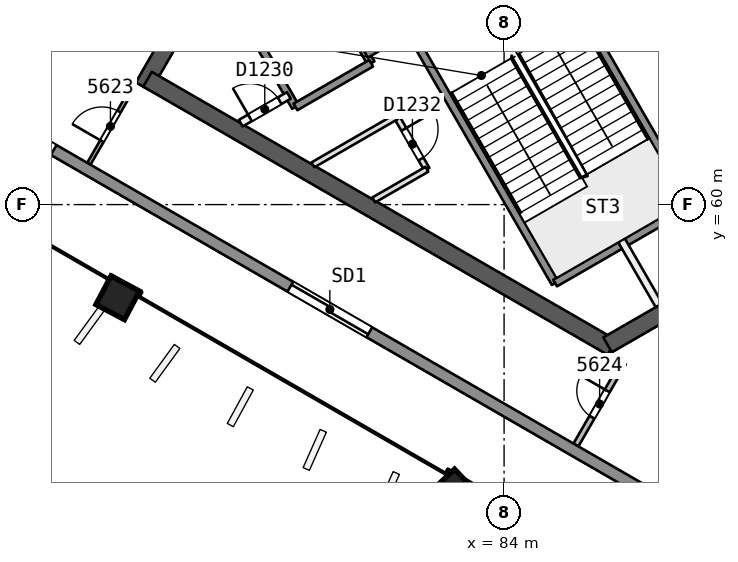
"""IFC4 building model, lengths in metres.
Left out: names, types, materials, properties, quantities, classifications, styles, units other than length and angle.
Written with IfcOpenShell. Run it as: python <this file> out.ifc"""

import sys

from ifc_helpers import new_model, si_unit, direction, frame, frame_2d, origin, origin_2d, place, context, subcontext, project, spatial, rectangle, extrude, element, fill, save


model = new_model("IFC4")
c1 = context("Model", 3, precision=1e-05, world=origin(), true_north=direction((0.0, 1.0)))
c2 = subcontext(c1, "Body", "Model", "MODEL_VIEW")
j1 = project(units=[si_unit("LENGTHUNIT", "METRE"), si_unit("PLANEANGLEUNIT", "RADIAN")], contexts=[c1])
p1 = place(None, origin())
s1 = spatial("IfcSite", under=j1, at=p1, CompositionType="ELEMENT")
p2 = place(p1, origin())
s2 = spatial("IfcBuilding", under=s1, at=p2, CompositionType="ELEMENT")
p3 = place(p2, frame((0.0, 0.0, 228.0)))
s3 = spatial("IfcBuildingStorey", under=s2, at=p3, CompositionType="ELEMENT", Elevation=228.0)
p4 = place(p3, frame((79.63, 71.981, 0.0), z_axis=(0.0, 0.0, 1.0), x_axis=(-0.500002171595, -0.86602415001, 0.0)))
e1 = element("IfcWall", 1, at=p4, inside=s3, PredefinedType="SHEAR", context=c2, shape_type="SweptSolid", body=[
    extrude(rectangle(XDim=10.25, YDim=0.45, at=frame_2d((5.125, 0.0))), origin(), (0.0, 0.0, 1.0), 3.7),
])
p5 = place(p4, frame((0.82, 0.0, 0.0)))
e2 = element("IfcOpeningElement", 2, at=p5, cuts=e1, PredefinedType="OPENING", context=c2, shape_type="SweptSolid", body=[
    extrude(rectangle(XDim=1.2, YDim=2.1, at=frame_2d((0.6, 1.05))), frame((0.0, 0.235, 0.0), z_axis=(0.0, -1.0, 0.0), x_axis=(1.0, 0.0, 0.0)), (0.0, 0.0, 1.0), 0.471),
])
p6 = place(p3, frame((74.617, 63.299, 0.0), z_axis=(0.0, 0.0, 1.0), x_axis=(0.86602594008, -0.499999071108, 0.0)))
e3 = element("IfcWall", 3, at=p6, inside=s3, PredefinedType="SHEAR", context=c2, shape_type="SweptSolid", body=[
    extrude(rectangle(XDim=14.108, YDim=0.45, at=frame_2d((7.054, 0.0))), origin(), (0.0, 0.0, 1.0), 3.7),
])
p7 = place(p3, frame((86.723, 56.31, 0.0), z_axis=(0.0, 0.0, 1.0), x_axis=(0.866042179588, 0.49997094233, 0.0)))
e4 = element("IfcWall", 4, at=p7, inside=s3, PredefinedType="SHEAR", context=c2, shape_type="SweptSolid", body=[
    extrude(rectangle(XDim=3.515, YDim=0.45, at=frame_2d((1.758, 0.0))), origin(), (0.0, 0.0, 1.0), 3.7),
])
p8 = place(p3, frame((73.832, 57.52, 0.0), z_axis=(0.000857578916, 0.022824792675, 0.999739112668), x_axis=(-0.499948827021, -0.865819429986, 0.020196163479)))
e5 = element("IfcColumn", 5, at=p8, inside=s3, PredefinedType="COLUMN", context=c2, shape_type="SweptSolid", body=[
    extrude(rectangle(XDim=0.85, YDim=0.85, at=origin_2d()), origin(), (0.0, 0.0, 1.0), 3.701),
])
p9 = place(p3, frame((82.69, 52.406, 0.0), z_axis=(-0.008376454378, 0.028163354484, 0.999568237028), x_axis=(-0.500239696169, -0.865651362756, 0.020198132002)))
e6 = element("IfcColumn", 6, at=p9, inside=s3, PredefinedType="COLUMN", context=c2, shape_type="SweptSolid", body=[
    extrude(rectangle(XDim=0.85, YDim=0.85, at=origin_2d()), origin(), (0.0, 0.0, 1.0), 3.702),
])
p10 = place(p3, frame((69.293, 63.257, 0.0), z_axis=(0.0, 0.0, 1.0), x_axis=(0.49999314277, 0.866029362772, 0.0)))
e7 = element("IfcWall", 7, at=p10, inside=s3, PredefinedType="PARTITIONING", context=c2, shape_type="SweptSolid", body=[
    extrude(rectangle(XDim=10.254, YDim=0.2, at=frame_2d((5.127, 0.0))), origin(), (0.0, 0.0, 1.0), 3.3),
])
p11 = place(p3, frame((73.073, 61.074, 0.0), z_axis=(0.0, 0.0, 1.0), x_axis=(0.499948534732, 0.866055115232, 0.0)))
e8 = element("IfcWall", 8, at=p11, inside=s3, PredefinedType="PARTITIONING", context=c2, shape_type="SweptSolid", body=[
    extrude(rectangle(XDim=2.275, YDim=0.1, at=frame_2d((1.137, 0.0))), origin(), (0.0, 0.0, 1.0), 3.3),
])
p12 = place(p11, frame((0.687, 0.0, 0.0)))
e9 = element("IfcOpeningElement", 9, at=p12, cuts=e8, PredefinedType="OPENING", context=c2, shape_type="SweptSolid", body=[
    extrude(rectangle(XDim=0.9, YDim=2.1, at=frame_2d((0.45, 1.05))), frame((0.0, 0.061, 0.0), z_axis=(0.0, -1.0, 0.0), x_axis=(1.0, 0.0, 0.0)), (0.0, 0.0, 1.0), 0.121),
])
p13 = place(p3, frame((85.89, 53.674, 0.0), z_axis=(0.0, 0.0, 1.0), x_axis=(0.500047477074, 0.865997991148, 0.0)))
e10 = element("IfcWall", 10, at=p13, inside=s3, PredefinedType="PARTITIONING", context=c2, shape_type="SweptSolid", body=[
    extrude(rectangle(XDim=2.492, YDim=0.15, at=frame_2d((1.246, 0.0))), origin(), (0.0, 0.0, 1.0), 3.3),
])
p14 = place(p13, frame((0.846, 0.0, 0.0)))
e11 = element("IfcOpeningElement", 11, at=p14, cuts=e10, PredefinedType="OPENING", context=c2, shape_type="SweptSolid", body=[
    extrude(rectangle(XDim=0.8, YDim=2.1, at=frame_2d((0.4, 1.05))), frame((0.0, 0.085, 0.0), z_axis=(0.0, -1.0, 0.0), x_axis=(1.0, 0.0, 0.0)), (0.0, 0.0, 1.0), 0.171),
])
p15 = place(p3, frame((92.503, 54.834, 0.0), z_axis=(0.0, 0.0, 1.0), x_axis=(-0.866011086668, -0.500024797153, 0.0)))
e12 = element("IfcWall", 12, at=p15, inside=s3, PredefinedType="SOLIDWALL", context=c2, shape_type="SweptSolid", body=[
    extrude(rectangle(XDim=5.149, YDim=0.3, at=frame_2d((2.575, 0.0))), origin(), (0.0, 0.0, 1.0), 3.3),
])
p16 = place(p3, frame((88.043, 52.259, 0.0), z_axis=(0.0, 0.0, 1.0), x_axis=(-0.86602387423, 0.500002649256, 0.0)))
e13 = element("IfcWall", 13, at=p16, inside=s3, PredefinedType="SOLIDWALL", context=c2, shape_type="SweptSolid", body=[
    extrude(rectangle(XDim=50.333, YDim=0.3, at=frame_2d((25.167, 0.0))), origin(), (0.0, 0.0, 1.0), 3.3),
])
p17 = place(p16, frame((23.187, 0.0, 0.0)))
e14 = element("IfcOpeningElement", 14, at=p17, cuts=e13, PredefinedType="OPENING", context=c2, shape_type="SweptSolid", body=[
    extrude(rectangle(XDim=2.4, YDim=2.4, at=frame_2d((1.2, 1.2))), frame((0.0, 0.161, 0.0), z_axis=(0.0, -1.0, 0.0), x_axis=(1.0, 0.0, 0.0)), (0.0, 0.0, 1.0), 0.321),
])
p18 = place(p16, frame((28.799, 0.0, 0.0)))
e15 = element("IfcOpeningElement", 15, at=p18, cuts=e13, PredefinedType="OPENING", context=c2, shape_type="SweptSolid", body=[
    extrude(rectangle(XDim=2.4, YDim=2.4, at=frame_2d((1.2, 1.2))), frame((0.0, 0.161, 0.0), z_axis=(0.0, -1.0, 0.0), x_axis=(1.0, 0.0, 0.0)), (0.0, 0.0, 1.0), 0.321),
])
p19 = place(p16, frame((39.164, 0.0, 0.0)))
e16 = element("IfcOpeningElement", 16, at=p19, cuts=e13, PredefinedType="OPENING", context=c2, shape_type="SweptSolid", body=[
    extrude(rectangle(XDim=2.4, YDim=2.4, at=frame_2d((1.2, 1.2))), frame((0.0, 0.161, 0.0), z_axis=(0.0, -1.0, 0.0), x_axis=(1.0, 0.0, 0.0)), (0.0, 0.0, 1.0), 0.321),
])
p20 = place(p16, frame((18.354, 0.0, 0.0)))
e17 = element("IfcOpeningElement", 17, at=p20, cuts=e13, PredefinedType="OPENING", context=c2, shape_type="SweptSolid", body=[
    extrude(rectangle(XDim=2.4, YDim=2.4, at=frame_2d((1.2, 1.2))), frame((0.0, 0.161, 0.0), z_axis=(0.0, -1.0, 0.0), x_axis=(1.0, 0.0, 0.0)), (0.0, 0.0, 1.0), 0.321),
])
p21 = place(p16, frame((8.763, 0.0, 0.0)))
e18 = element("IfcOpeningElement", 18, at=p21, cuts=e13, PredefinedType="OPENING", context=c2, shape_type="SweptSolid", body=[
    extrude(rectangle(XDim=2.4, YDim=2.4, at=frame_2d((1.2, 1.2))), frame((0.0, 0.161, 0.0), z_axis=(0.0, -1.0, 0.0), x_axis=(1.0, 0.0, 0.0)), (0.0, 0.0, 1.0), 0.321),
])
p22 = place(p3, frame((77.135, 64.952, 0.0), z_axis=(0.0, 0.0, 1.0), x_axis=(0.499996545922, -0.866027397988, 0.0)))
e19 = element("IfcWall", 19, at=p22, inside=s3, PredefinedType="SOLIDWALL", context=c2, shape_type="SweptSolid", body=[
    extrude(rectangle(XDim=2.75, YDim=0.2, at=frame_2d((1.375, 0.0))), origin(), (0.0, 0.0, 1.0), 3.3),
])
p23 = place(p3, frame((81.169, 62.315, 0.0), z_axis=(0.0, 0.0, 1.0), x_axis=(0.499995408039, -0.866028054938, 0.0)))
e20 = element("IfcWall", 20, at=p23, inside=s3, PredefinedType="PARTITIONING", context=c2, shape_type="SweptSolid", body=[
    extrude(rectangle(XDim=1.6, YDim=0.15, at=frame_2d((0.8, 0.0))), origin(), (0.0, 0.0, 1.0), 3.3),
])
p24 = place(p23, frame((0.387, 0.0, 0.0)))
e21 = element("IfcOpeningElement", 21, at=p24, cuts=e20, PredefinedType="OPENING", context=c2, shape_type="SweptSolid", body=[
    extrude(rectangle(XDim=0.9, YDim=2.1, at=frame_2d((0.45, 1.05))), frame((0.0, 0.085, 0.0), z_axis=(0.0, -1.0, 0.0), x_axis=(1.0, 0.0, 0.0)), (0.0, 0.0, 1.0), 0.171),
])
p25 = place(p3, frame((79.127, 66.102, 0.0), z_axis=(0.0, 0.0, 1.0), x_axis=(0.499996545922, -0.866027397988, 0.0)))
e22 = element("IfcWall", 22, at=p25, inside=s3, PredefinedType="SOLIDWALL", context=c2, shape_type="SweptSolid", body=[
    extrude(rectangle(XDim=2.75, YDim=0.2, at=frame_2d((1.375, 0.0))), origin(), (0.0, 0.0, 1.0), 3.3),
])
p26 = place(p3, frame((81.493, 64.604, 0.0), z_axis=(0.0, 0.0, 1.0), x_axis=(0.500006057782, -0.866021906294, 0.0)))
e23 = element("IfcWall", 23, at=p26, inside=s3, PredefinedType="SOLIDWALL", context=c2, shape_type="SweptSolid", body=[
    extrude(rectangle(XDim=7.7, YDim=0.2, at=frame_2d((3.85, 0.0))), origin(), (0.0, 0.0, 1.0), 3.3),
])
p27 = place(p3, frame((87.09, 59.06, 0.0), z_axis=(0.0, 0.0, 1.0), x_axis=(0.500011643316, -0.866018681408, 0.0)))
e24 = element("IfcWall", 24, at=p27, inside=s3, PredefinedType="PARTITIONING", context=c2, shape_type="SweptSolid", body=[
    extrude(rectangle(XDim=1.973, YDim=0.2, at=frame_2d((0.987, 0.0))), origin(), (0.0, 0.0, 1.0), 3.3),
])
p28 = place(p3, frame((85.087, 66.679, 0.0), z_axis=(0.0, 0.0, 1.0), x_axis=(0.500019787375, -0.866013979237, 0.0)))
e25 = element("IfcWall", 25, at=p28, inside=s3, PredefinedType="SOLIDWALL", context=c2, shape_type="SweptSolid", body=[
    extrude(rectangle(XDim=7.7, YDim=0.2, at=frame_2d((3.85, 0.0))), origin(), (0.0, 0.0, 1.0), 3.3),
])
p29 = place(p28, frame((0.55, 0.0, 0.0)))
e26 = element("IfcOpeningElement", 26, at=p29, cuts=e25, PredefinedType="OPENING", context=c2, shape_type="SweptSolid", body=[
    extrude(rectangle(XDim=1.1, YDim=2.1, at=frame_2d((0.55, 1.05))), frame((0.0, 0.11, 0.0), z_axis=(0.0, -1.0, 0.0), x_axis=(1.0, 0.0, 0.0)), (0.0, 0.0, 1.0), 0.221),
])
p30 = place(p3, frame((77.07, 62.143, 0.0), z_axis=(0.0, 0.0, 1.0), x_axis=(0.866013036001, 0.500021421018, 0.0)))
e27 = element("IfcWall", 27, at=p30, inside=s3, PredefinedType="PARTITIONING", context=c2, shape_type="SweptSolid", body=[
    extrude(rectangle(XDim=1.461, YDim=0.2, at=frame_2d((0.73, 0.0))), origin(), (0.0, 0.0, 1.0), 3.3),
])
p31 = place(p30, frame((0.281, 0.0, 0.0)))
e28 = element("IfcOpeningElement", 28, at=p31, cuts=e27, PredefinedType="OPENING", context=c2, shape_type="SweptSolid", body=[
    extrude(rectangle(XDim=0.9, YDim=2.1, at=frame_2d((0.45, 1.05))), frame((0.0, 0.11, 0.0), z_axis=(0.0, -1.0, 0.0), x_axis=(1.0, 0.0, 0.0)), (0.0, 0.0, 1.0), 0.221),
])
p32 = place(p3, frame((80.367, 63.954, 0.0), z_axis=(0.0, 0.0, 1.0), x_axis=(0.866026575979, 0.499997969693, 0.0)))
e29 = element("IfcWall", 29, at=p32, inside=s3, PredefinedType="SOLIDWALL", context=c2, shape_type="SweptSolid", body=[
    extrude(rectangle(XDim=6.75, YDim=0.2, at=frame_2d((3.375, 0.0))), origin(), (0.0, 0.0, 1.0), 3.3),
])
p33 = place(p3, frame((78.51, 62.57, 0.0), z_axis=(0.0, 0.0, 1.0), x_axis=(0.866053019151, 0.499952165731, 0.0)))
e30 = element("IfcWall", 30, at=p33, inside=s3, PredefinedType="SOLIDWALL", context=c2, shape_type="SweptSolid", body=[
    extrude(rectangle(XDim=2.3, YDim=0.2, at=frame_2d((1.15, 0.0))), origin(), (0.0, 0.0, 1.0), 3.3),
])
p34 = place(p3, frame((78.97, 61.046, 0.0), z_axis=(0.0, 0.0, 1.0), x_axis=(0.866033475577, 0.499986018985, 0.0)))
e31 = element("IfcWall", 31, at=p34, inside=s3, PredefinedType="PARTITIONING", context=c2, shape_type="SweptSolid", body=[
    extrude(rectangle(XDim=2.539, YDim=0.15, at=frame_2d((1.27, 0.0))), origin(), (0.0, 0.0, 1.0), 3.3),
])
p35 = place(p3, frame((80.57, 60.122, 0.0), z_axis=(0.0, 0.0, 1.0), x_axis=(0.866039608017, 0.49997539674, 0.0)))
e32 = element("IfcWall", 32, at=p35, inside=s3, PredefinedType="PARTITIONING", context=c2, shape_type="SweptSolid", body=[
    extrude(rectangle(XDim=1.615, YDim=0.15, at=frame_2d((0.808, 0.0))), origin(), (0.0, 0.0, 1.0), 3.3),
])
p36 = place(p3, frame((85.343, 57.935, 0.0), z_axis=(0.0, 0.0, 1.0), x_axis=(0.866004344652, 0.500036473714, 0.0)))
e33 = element("IfcWall", 33, at=p36, inside=s3, PredefinedType="SOLIDWALL", context=c2, shape_type="SweptSolid", body=[
    extrude(rectangle(XDim=4.15, YDim=0.2, at=frame_2d((2.075, 0.0))), origin(), (0.0, 0.0, 1.0), 3.3),
])
p37 = place(p12, origin())
e34 = element("IfcDoor", 34, at=p37, inside=s3, OperationType="SINGLE_SWING_LEFT", PredefinedType="NOTDEFINED", context=c2, shape_type="SweptSolid", body=[
    extrude(rectangle(XDim=0.9, YDim=2.1, at=frame_2d((0.45, 1.05))), frame((0.0, 0.025, 0.0), z_axis=(0.0, -1.0, 0.0), x_axis=(1.0, 0.0, 0.0)), (0.0, 0.0, 1.0), 0.05),
])
fill(e9, e34)
p38 = place(p14, origin())
e35 = element("IfcDoor", 35, at=p38, inside=s3, OperationType="SINGLE_SWING_RIGHT", PredefinedType="NOTDEFINED", context=c2, shape_type="SweptSolid", body=[
    extrude(rectangle(XDim=0.8, YDim=2.1, at=frame_2d((0.4, 1.05))), frame((0.0, 0.025, 0.0), z_axis=(0.0, -1.0, 0.0), x_axis=(1.0, 0.0, 0.0)), (0.0, 0.0, 1.0), 0.05),
])
fill(e11, e35)
p39 = place(p20, origin())
e36 = element("IfcDoor", 36, at=p39, inside=s3, OperationType="SLIDING_TO_RIGHT", PredefinedType="NOTDEFINED", context=c2, shape_type="SweptSolid", body=[
    extrude(rectangle(XDim=2.4, YDim=2.4, at=frame_2d((1.2, 1.2))), frame((0.0, 0.025, 0.0), z_axis=(0.0, -1.0, 0.0), x_axis=(1.0, 0.0, 0.0)), (0.0, 0.0, 1.0), 0.05),
])
fill(e17, e36)
p40 = place(p21, origin())
e37 = element("IfcDoor", 37, at=p40, inside=s3, OperationType="SLIDING_TO_LEFT", PredefinedType="NOTDEFINED", context=c2, shape_type="SweptSolid", body=[
    extrude(rectangle(XDim=2.4, YDim=2.4, at=frame_2d((1.2, 1.2))), frame((0.0, 0.025, 0.0), z_axis=(0.0, -1.0, 0.0), x_axis=(1.0, 0.0, 0.0)), (0.0, 0.0, 1.0), 0.05),
])
fill(e18, e37)
p41 = place(p31, origin())
e38 = element("IfcDoor", 38, at=p41, inside=s3, OperationType="SINGLE_SWING_LEFT", PredefinedType="NOTDEFINED", context=c2, shape_type="SweptSolid", body=[
    extrude(rectangle(XDim=0.9, YDim=2.1, at=frame_2d((0.45, 1.05))), frame((0.0, 0.025, 0.0), z_axis=(0.0, -1.0, 0.0), x_axis=(1.0, 0.0, 0.0)), (0.0, 0.0, 1.0), 0.05),
])
fill(e28, e38)
p42 = place(p24, origin())
e39 = element("IfcDoor", 39, at=p42, inside=s3, OperationType="SINGLE_SWING_LEFT", PredefinedType="NOTDEFINED", context=c2, shape_type="SweptSolid", body=[
    extrude(rectangle(XDim=0.9, YDim=2.1, at=frame_2d((0.45, 1.05))), frame((0.0, 0.025, 0.0), z_axis=(0.0, -1.0, 0.0), x_axis=(1.0, 0.0, 0.0)), (0.0, 0.0, 1.0), 0.05),
])
fill(e21, e39)
save(model, sys.argv[1])
